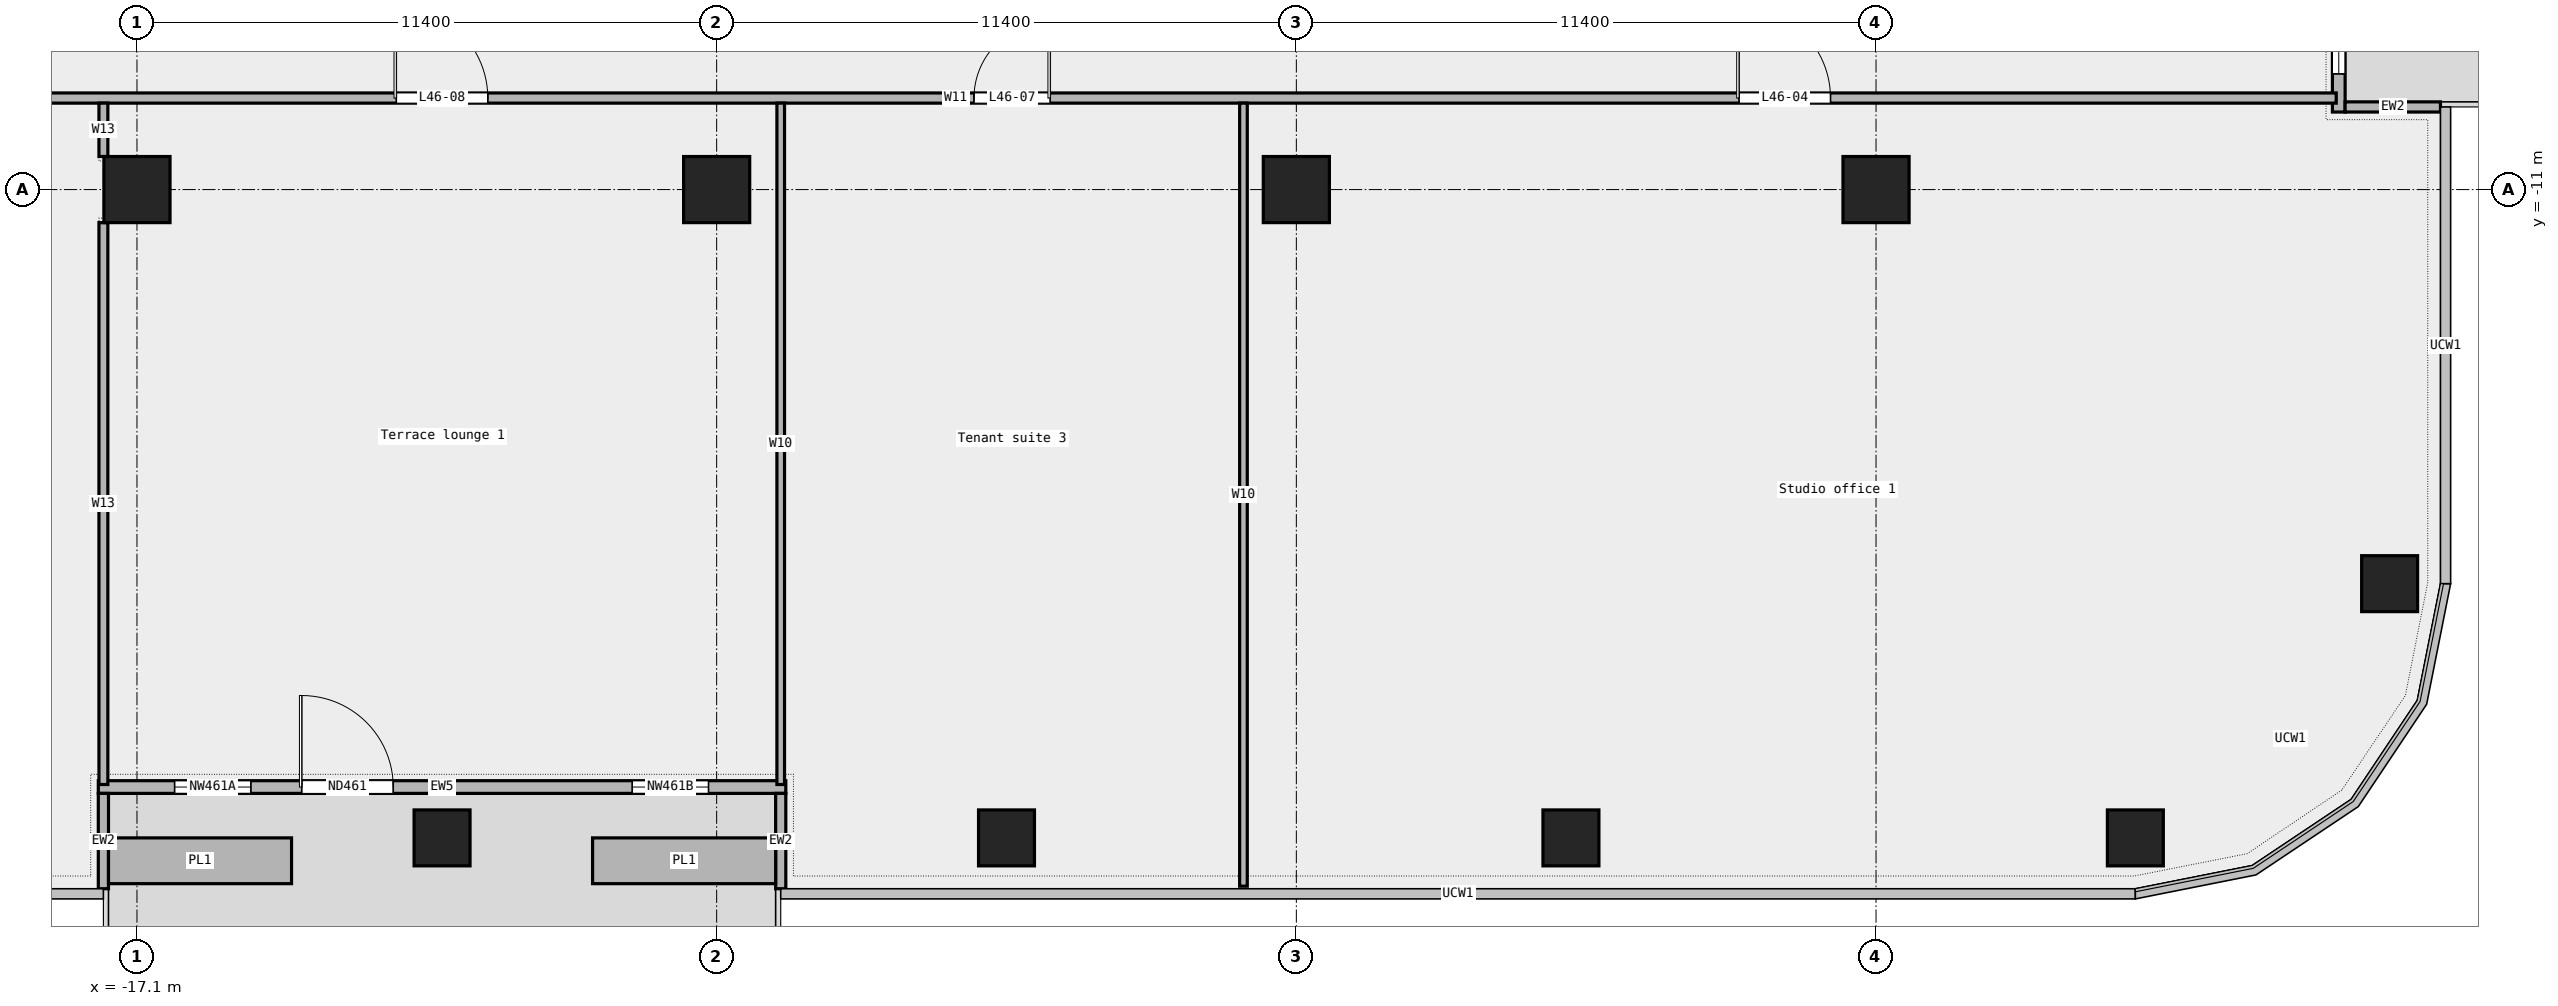
"""IFC4 building model, lengths in metres.
Left out: names, types, materials, properties, quantities, classifications, styles, units other than length and angle.
Written with IfcOpenShell. Run it as: python <this file> out.ifc"""

import sys

from ifc_helpers import new_model, si_unit, direction, frame, frame_2d, origin, origin_2d, place, context, subcontext, project, spatial, rectangle, extrude, element, fill, save


model = new_model("IFC4")
c1 = context("Model", 3, precision=1e-05, world=origin(), true_north=direction((0.0, 1.0)))
c2 = subcontext(c1, "Body", "Model", "MODEL_VIEW")
j1 = project(units=[si_unit("LENGTHUNIT", "METRE"), si_unit("PLANEANGLEUNIT", "RADIAN")], contexts=[c1])
p1 = place(None, origin())
s1 = spatial("IfcSite", under=j1, at=p1, CompositionType="ELEMENT")
p2 = place(p1, origin())
s2 = spatial("IfcBuilding", under=s1, at=p2, CompositionType="ELEMENT")
p3 = place(p2, frame((0.0, 0.0, 219.0)))
s3 = spatial("IfcBuildingStorey", under=s2, at=p3, CompositionType="ELEMENT", Elevation=219.0)
for number, where, z_axis, x_axis in (
    (1, (-11.1, -23.75, 0.0), (0.0, 0.0, 1.0), (1.0, 0.0, 0.0)),
    (2, (0.0, -23.75, 0.0), (0.0, 0.0, 1.0), (1.0, 0.0, 0.0)),
    (3, (11.1, -23.75, 0.0), (0.0, 0.0, 1.0), (1.0, 0.0, 0.0)),
    (4, (22.2, -23.75, 0.0), (0.0, 0.0, 1.0), (1.0, 0.0, 0.0)),
    (5, (27.2, -18.75, 0.0), (0.0, 0.0, 1.0), (1.0, 0.0, 0.0)),
):
    element("IfcColumn", number, at=place(p3, frame(where, z_axis=z_axis, x_axis=x_axis)), inside=s3, PredefinedType="COLUMN", context=c2, shape_type="SweptSolid", body=[
        extrude(rectangle(XDim=1.1, YDim=1.1, at=origin_2d()), origin(), (0.0, 0.0, 1.0), 3.6),
    ])
for number, where, z_axis, x_axis in (
    (6, (-17.1, -11.0, 0.0), (0.0, 0.0, 1.0), (1.0, 0.0, 0.0)),
    (7, (-5.7, -11.0, 0.0), (0.0, 0.0, 1.0), (1.0, 0.0, 0.0)),
    (8, (5.7, -11.0, 0.0), (0.0, 0.0, 1.0), (1.0, 0.0, 0.0)),
    (9, (17.1, -11.0, 0.0), (0.0, 0.0, 1.0), (1.0, 0.0, 0.0)),
):
    element("IfcColumn", number, at=place(p3, frame(where, z_axis=z_axis, x_axis=x_axis)), inside=s3, PredefinedType="COLUMN", context=c2, shape_type="SweptSolid", body=[
        extrude(rectangle(XDim=1.3, YDim=1.3, at=origin_2d()), origin(), (0.0, 0.0, 1.0), 3.6),
    ])
p4 = place(p3, frame((-17.86, -22.75, 0.0), z_axis=(0.0, 0.0, 1.0), x_axis=(1.0, 0.0, 0.0)))
e10 = element("IfcWall", 10, at=p4, inside=s3, PredefinedType="STANDARD", context=c2, shape_type="SweptSolid", body=[
    extrude(rectangle(XDim=13.52, YDim=0.25, at=frame_2d((6.76, 0.0))), origin(), (0.0, 0.0, 1.0), 3.6),
])
p5 = place(p4, frame((1.5, 0.0, 0.45)))
e11 = element("IfcOpeningElement", 11, at=p5, cuts=e10, PredefinedType="OPENING", context=c2, shape_type="SweptSolid", body=[
    extrude(rectangle(XDim=1.5, YDim=2.4, at=frame_2d((0.75, 1.2))), frame((0.0, 0.137, 0.0), z_axis=(0.0, -1.0, 0.0), x_axis=(1.0, 0.0, 0.0)), (0.0, 0.0, 1.0), 0.274),
])
p6 = place(p4, frame((4.0, 0.0, 0.0)))
e12 = element("IfcOpeningElement", 12, at=p6, cuts=e10, PredefinedType="OPENING", context=c2, shape_type="SweptSolid", body=[
    extrude(rectangle(XDim=1.8, YDim=2.4, at=frame_2d((0.9, 1.2))), frame((0.0, 0.137, 0.0), z_axis=(0.0, -1.0, 0.0), x_axis=(1.0, 0.0, 0.0)), (0.0, 0.0, 1.0), 0.274),
])
p7 = place(p4, frame((10.5, 0.0, 0.45)))
e13 = element("IfcOpeningElement", 13, at=p7, cuts=e10, PredefinedType="OPENING", context=c2, shape_type="SweptSolid", body=[
    extrude(rectangle(XDim=1.5, YDim=2.4, at=frame_2d((0.75, 1.2))), frame((0.0, 0.137, 0.0), z_axis=(0.0, -1.0, 0.0), x_axis=(1.0, 0.0, 0.0)), (0.0, 0.0, 1.0), 0.274),
])
for number, where, z_axis, x_axis in (
    (14, (-17.76, -24.75, 0.0), (0.0, 0.0, 1.0), (0.0, 1.0, 0.0)),
    (15, (-4.44, -24.75, 0.0), (0.0, 0.0, 1.0), (0.0, 1.0, 0.0)),
):
    element("IfcWall", number, at=place(p3, frame(where, z_axis=z_axis, x_axis=x_axis)), inside=s3, PredefinedType="STANDARD", context=c2, shape_type="SweptSolid", body=[
        extrude(rectangle(XDim=1.875, YDim=0.2, at=frame_2d((0.938, 0.0))), origin(), (0.0, 0.0, 1.0), 3.6),
    ])
for number, where, z_axis, x_axis in (
    (16, (-17.66, -24.2, 0.0), (0.0, 0.0, 1.0), (1.0, 0.0, 0.0)),
    (17, (-8.14, -24.2, 0.0), (0.0, 0.0, 1.0), (1.0, 0.0, 0.0)),
):
    element("IfcWall", number, at=place(p3, frame(where, z_axis=z_axis, x_axis=x_axis)), inside=s3, PredefinedType="STANDARD", context=c2, shape_type="SweptSolid", body=[
        extrude(rectangle(XDim=3.6, YDim=0.9, at=frame_2d((1.8, 0.0))), origin(), (0.0, 0.0, 1.0), 0.7),
    ])
p8 = place(p3, frame((26.2, -9.475, 0.0), z_axis=(0.0, 0.0, 1.0), x_axis=(0.0, 1.0, 0.0)))
e18 = element("IfcWall", 18, at=p8, inside=s3, PredefinedType="STANDARD", context=c2, shape_type="SweptSolid", body=[
    extrude(rectangle(XDim=14.263, YDim=0.25, at=frame_2d((7.131, 0.0))), origin(), (0.0, 0.0, 1.0), 3.6),
])
p9 = place(p8, frame((0.75, 0.0, 0.45)))
e19 = element("IfcOpeningElement", 19, at=p9, cuts=e18, PredefinedType="OPENING", context=c2, shape_type="SweptSolid", body=[
    extrude(rectangle(XDim=1.5, YDim=2.4, at=frame_2d((0.75, 1.2))), frame((0.0, 0.137, 0.0), z_axis=(0.0, -1.0, 0.0), x_axis=(1.0, 0.0, 0.0)), (0.0, 0.0, 1.0), 0.274),
])
p10 = place(p8, frame((6.25, 0.0, 0.0)))
e20 = element("IfcOpeningElement", 20, at=p10, cuts=e18, PredefinedType="OPENING", context=c2, shape_type="SweptSolid", body=[
    extrude(rectangle(XDim=1.8, YDim=2.4, at=frame_2d((0.9, 1.2))), frame((0.0, 0.137, 0.0), z_axis=(0.0, -1.0, 0.0), x_axis=(1.0, 0.0, 0.0)), (0.0, 0.0, 1.0), 0.274),
])
p11 = place(p8, frame((11.0, 0.0, 0.45)))
e21 = element("IfcOpeningElement", 21, at=p11, cuts=e18, PredefinedType="OPENING", context=c2, shape_type="SweptSolid", body=[
    extrude(rectangle(XDim=1.5, YDim=2.4, at=frame_2d((0.75, 1.2))), frame((0.0, 0.137, 0.0), z_axis=(0.0, -1.0, 0.0), x_axis=(1.0, 0.0, 0.0)), (0.0, 0.0, 1.0), 0.274),
])
p12 = place(p3, frame((28.2, -9.375, 0.0), z_axis=(0.0, 0.0, 1.0), x_axis=(-1.0, 0.0, 0.0)))
e22 = element("IfcWall", 22, at=p12, inside=s3, PredefinedType="STANDARD", context=c2, shape_type="SweptSolid", body=[
    extrude(rectangle(XDim=1.875, YDim=0.2, at=frame_2d((0.938, 0.0))), origin(), (0.0, 0.0, 1.0), 3.6),
])
p13 = place(p3, frame((-28.15, -9.2, 0.0), z_axis=(0.0, 0.0, 1.0), x_axis=(1.0, 0.0, 0.0)))
e23 = element("IfcWall", 23, at=p13, inside=s3, PredefinedType="PARTITIONING", context=c2, shape_type="SweptSolid", body=[
    extrude(rectangle(XDim=54.3, YDim=0.2, at=frame_2d((27.15, 0.0))), origin(), (0.0, 0.0, 1.0), 3.6),
])
p14 = place(p13, frame((42.555, 0.0, 0.0)))
e24 = element("IfcOpeningElement", 24, at=p14, cuts=e23, PredefinedType="OPENING", context=c2, shape_type="SweptSolid", body=[
    extrude(rectangle(XDim=1.8, YDim=2.1, at=frame_2d((0.9, 1.05))), frame((0.0, 0.112, 0.0), z_axis=(0.0, -1.0, 0.0), x_axis=(1.0, 0.0, 0.0)), (0.0, 0.0, 1.0), 0.224),
])
p15 = place(p13, frame((27.51, 0.0, 0.0)))
e25 = element("IfcOpeningElement", 25, at=p15, cuts=e23, PredefinedType="OPENING", context=c2, shape_type="SweptSolid", body=[
    extrude(rectangle(XDim=1.5, YDim=2.1, at=frame_2d((0.75, 1.05))), frame((0.0, 0.112, 0.0), z_axis=(0.0, -1.0, 0.0), x_axis=(1.0, 0.0, 0.0)), (0.0, 0.0, 1.0), 0.224),
])
p16 = place(p13, frame((16.15, 0.0, 0.0)))
e26 = element("IfcOpeningElement", 26, at=p16, cuts=e23, PredefinedType="OPENING", context=c2, shape_type="SweptSolid", body=[
    extrude(rectangle(XDim=1.8, YDim=2.1, at=frame_2d((0.9, 1.05))), frame((0.0, 0.112, 0.0), z_axis=(0.0, -1.0, 0.0), x_axis=(1.0, 0.0, 0.0)), (0.0, 0.0, 1.0), 0.224),
])
p17 = place(p13, frame((4.545, 0.0, 0.0)))
e27 = element("IfcOpeningElement", 27, at=p17, cuts=e23, PredefinedType="OPENING", context=c2, shape_type="SweptSolid", body=[
    extrude(rectangle(XDim=1.5, YDim=2.1, at=frame_2d((0.75, 1.05))), frame((0.0, 0.112, 0.0), z_axis=(0.0, -1.0, 0.0), x_axis=(1.0, 0.0, 0.0)), (0.0, 0.0, 1.0), 0.224),
])
p18 = place(p3, frame((-17.76, -22.7, 0.0), z_axis=(0.0, 0.0, 1.0), x_axis=(0.0, 1.0, 0.0)))
e28 = element("IfcWall", 28, at=p18, inside=s3, PredefinedType="PARTITIONING", context=c2, shape_type="SweptSolid", body=[
    extrude(rectangle(XDim=11.05, YDim=0.175, at=frame_2d((5.525, 0.0))), origin(), (0.0, 0.0, 1.0), 3.6),
])
p19 = place(p3, frame((-17.76, -10.35, 0.0), z_axis=(0.0, 0.0, 1.0), x_axis=(0.0, 1.0, 0.0)))
e29 = element("IfcWall", 29, at=p19, inside=s3, PredefinedType="PARTITIONING", context=c2, shape_type="SweptSolid", body=[
    extrude(rectangle(XDim=1.05, YDim=0.175, at=frame_2d((0.525, 0.0))), origin(), (0.0, 0.0, 1.0), 3.6),
])
p20 = place(p3, frame((-4.44, -22.7, 0.0), z_axis=(0.0, 0.0, 1.0), x_axis=(0.0, 1.0, 0.0)))
e30 = element("IfcWall", 30, at=p20, inside=s3, PredefinedType="PARTITIONING", context=c2, shape_type="SweptSolid", body=[
    extrude(rectangle(XDim=13.4, YDim=0.15, at=frame_2d((6.7, 0.0))), origin(), (0.0, 0.0, 1.0), 3.6),
])
p21 = place(p3, frame((4.66, -24.7, 0.0), z_axis=(0.0, 0.0, 1.0), x_axis=(0.0, 1.0, 0.0)))
e31 = element("IfcWall", 31, at=p21, inside=s3, PredefinedType="PARTITIONING", context=c2, shape_type="SweptSolid", body=[
    extrude(rectangle(XDim=15.4, YDim=0.15, at=frame_2d((7.7, 0.0))), origin(), (0.0, 0.0, 1.0), 3.6),
])
p22 = place(p5, origin())
e32 = element("IfcWindow", 32, at=p22, inside=s3, PartitioningType="SINGLE_PANEL", PredefinedType="WINDOW", context=c2, shape_type="SweptSolid", body=[
    extrude(rectangle(XDim=1.5, YDim=2.4, at=frame_2d((0.75, 1.2))), frame((0.0, 0.03, 0.0), z_axis=(0.0, -1.0, 0.0), x_axis=(1.0, 0.0, 0.0)), (0.0, 0.0, 1.0), 0.06),
])
fill(e11, e32)
p23 = place(p6, origin())
e33 = element("IfcDoor", 33, at=p23, inside=s3, OperationType="DOUBLE_DOOR_SINGLE_SWING", PredefinedType="DOOR", context=c2, shape_type="SweptSolid", body=[
    extrude(rectangle(XDim=1.8, YDim=2.4, at=frame_2d((0.9, 1.2))), frame((0.0, 0.025, 0.0), z_axis=(0.0, -1.0, 0.0), x_axis=(1.0, 0.0, 0.0)), (0.0, 0.0, 1.0), 0.05),
])
fill(e12, e33)
p24 = place(p7, origin())
e34 = element("IfcWindow", 34, at=p24, inside=s3, PartitioningType="SINGLE_PANEL", PredefinedType="WINDOW", context=c2, shape_type="SweptSolid", body=[
    extrude(rectangle(XDim=1.5, YDim=2.4, at=frame_2d((0.75, 1.2))), frame((0.0, 0.03, 0.0), z_axis=(0.0, -1.0, 0.0), x_axis=(1.0, 0.0, 0.0)), (0.0, 0.0, 1.0), 0.06),
])
fill(e13, e34)
p25 = place(p9, origin())
e35 = element("IfcWindow", 35, at=p25, inside=s3, PartitioningType="SINGLE_PANEL", PredefinedType="WINDOW", context=c2, shape_type="SweptSolid", body=[
    extrude(rectangle(XDim=1.5, YDim=2.4, at=frame_2d((0.75, 1.2))), frame((0.0, 0.03, 0.0), z_axis=(0.0, -1.0, 0.0), x_axis=(1.0, 0.0, 0.0)), (0.0, 0.0, 1.0), 0.06),
])
fill(e19, e35)
p26 = place(p14, origin())
e36 = element("IfcDoor", 36, at=p26, inside=s3, OperationType="DOUBLE_DOOR_SINGLE_SWING", PredefinedType="DOOR", context=c2, shape_type="SweptSolid", body=[
    extrude(rectangle(XDim=1.8, YDim=2.1, at=frame_2d((0.9, 1.05))), frame((0.0, 0.025, 0.0), z_axis=(0.0, -1.0, 0.0), x_axis=(1.0, 0.0, 0.0)), (0.0, 0.0, 1.0), 0.05),
])
fill(e24, e36)
p27 = place(p15, origin())
e37 = element("IfcDoor", 37, at=p27, inside=s3, OperationType="DOUBLE_DOOR_SINGLE_SWING", PredefinedType="DOOR", context=c2, shape_type="SweptSolid", body=[
    extrude(rectangle(XDim=1.5, YDim=2.1, at=frame_2d((0.75, 1.05))), frame((0.0, 0.025, 0.0), z_axis=(0.0, -1.0, 0.0), x_axis=(1.0, 0.0, 0.0)), (0.0, 0.0, 1.0), 0.05),
])
fill(e25, e37)
p28 = place(p16, origin())
e38 = element("IfcDoor", 38, at=p28, inside=s3, OperationType="DOUBLE_DOOR_SINGLE_SWING", PredefinedType="DOOR", context=c2, shape_type="SweptSolid", body=[
    extrude(rectangle(XDim=1.8, YDim=2.1, at=frame_2d((0.9, 1.05))), frame((0.0, 0.025, 0.0), z_axis=(0.0, -1.0, 0.0), x_axis=(1.0, 0.0, 0.0)), (0.0, 0.0, 1.0), 0.05),
])
fill(e26, e38)
save(model, sys.argv[1])
